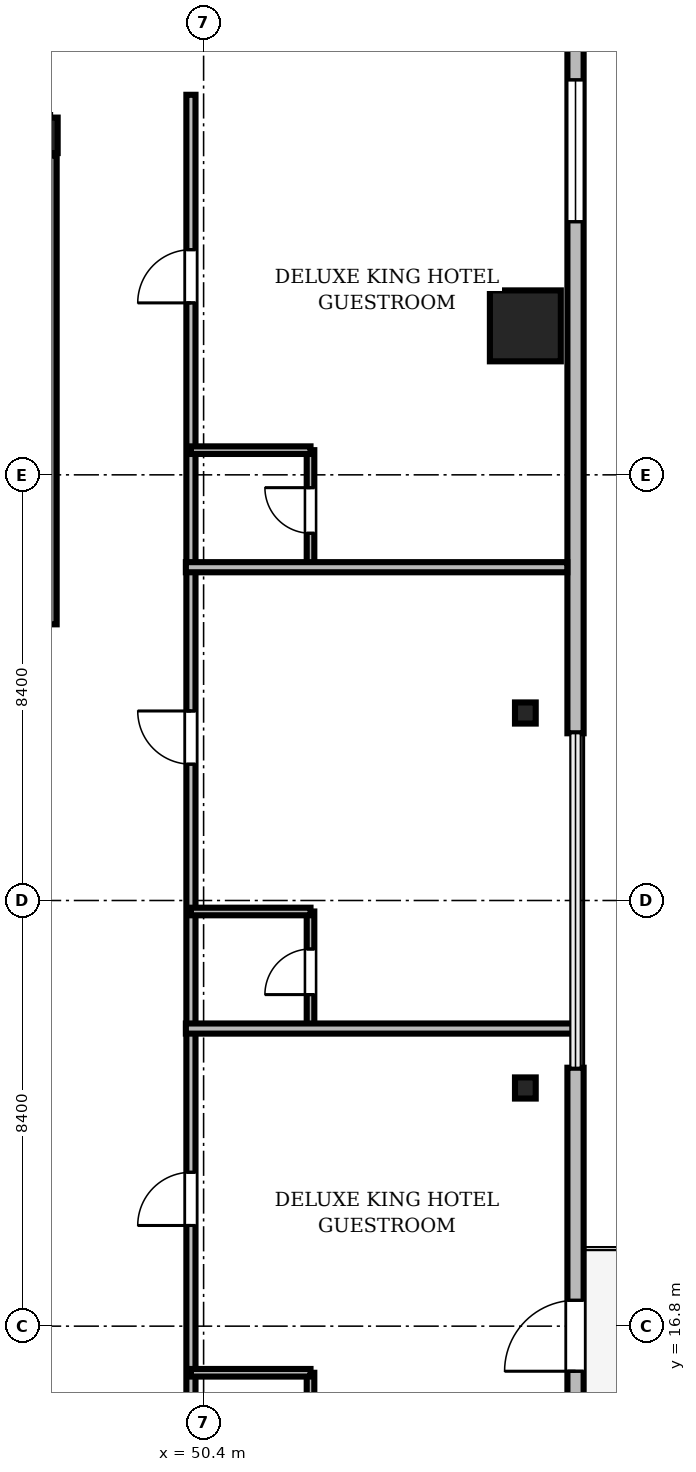
"""IFC4 building model, lengths in metres.
Left out: names, types, materials, properties, quantities, classifications, styles, units other than length and angle.
Written with IfcOpenShell. Run it as: python <this file> out.ifc"""

import sys

from ifc_helpers import new_model, si_unit, direction, frame, frame_2d, origin, origin_2d, place, context, subcontext, project, spatial, rectangle, i_section, extrude, source, transform, mapped, element, fill, save


model = new_model("IFC4")
c1 = context("Model", 3, precision=1e-05, world=origin(), true_north=direction((0.0, 1.0)))
c2 = subcontext(c1, "Body", "Model", "MODEL_VIEW")
j1 = project(units=[si_unit("LENGTHUNIT", "METRE"), si_unit("PLANEANGLEUNIT", "RADIAN")], contexts=[c1])
p1 = place(None, origin())
s1 = spatial("IfcSite", under=j1, at=p1, CompositionType="ELEMENT")
p2 = place(p1, origin())
s2 = spatial("IfcBuilding", under=s1, at=p2, CompositionType="ELEMENT")
p3 = place(p2, frame((0.0, 0.0, 218.55)))
s3 = spatial("IfcBuildingStorey", under=s2, at=p3, CompositionType="ELEMENT", Elevation=218.55)
m1 = source(origin(), c2, "Body", "SweptSolid", [
    extrude(i_section(OverallWidth=0.3, OverallDepth=0.7, WebThickness=0.017, FlangeThickness=0.032, FilletRadius=0.027, at=origin_2d()), origin(), (0.0, 0.0, 1.0), 3.53),
])
p4 = place(p3, frame((47.37, 40.3, 0.0), z_axis=(0.0, 0.0, 1.0), x_axis=(1.0, 0.0, 0.0)))
e1 = element("IfcColumn", 1, at=p4, inside=s3, PredefinedType="COLUMN", context=c2, shape_type="MappedRepresentation", body=[
    mapped(m1, transform((0.0, 0.0, 0.0), scale=1.0)),
])
m2 = source(origin(), c2, "Body", "SweptSolid", [
    extrude(rectangle(XDim=1.4, YDim=1.4, at=origin_2d()), origin(), (0.0, 0.0, 1.0), 3.53),
])
p5 = place(p3, frame((56.75, 36.54, 0.0), z_axis=(0.0, 0.0, 1.0), x_axis=(1.0, 0.0, 0.0)))
e2 = element("IfcColumn", 2, at=p5, inside=s3, PredefinedType="COLUMN", context=c2, shape_type="MappedRepresentation", body=[
    mapped(m2, transform((0.0, 0.0, 0.0), scale=1.0)),
])
m3 = source(origin(), c2, "Body", "SweptSolid", [
    extrude(i_section(OverallWidth=0.409, OverallDepth=0.417, WebThickness=0.021, FlangeThickness=0.033, FilletRadius=0.015, at=origin_2d()), origin(), (0.0, 0.0, 1.0), 3.53),
])
for number, where, z_axis, x_axis in (
    (3, (56.75, 21.5, 0.0), (0.0, 0.0, 1.0), (1.0, 0.0, 0.0)),
    (4, (56.75, 28.9, 0.0), (0.0, 0.0, 1.0), (1.0, 0.0, 0.0)),
):
    element("IfcColumn", number, at=place(p3, frame(where, z_axis=z_axis, x_axis=x_axis)), inside=s3, PredefinedType="COLUMN", context=c2, shape_type="MappedRepresentation", body=[
        mapped(m3, transform((0.0, 0.0, 0.0), scale=1.0)),
    ])
m4 = source(origin(), c2, "Body", "SweptSolid", [
    extrude(rectangle(XDim=15.6, YDim=0.32, at=frame_2d((7.8, 0.0))), origin(), (0.0, 0.0, 1.0), 3.53),
])
p6 = place(p3, frame((57.74, 6.3, 0.0), z_axis=(0.0, 0.0, 1.0), x_axis=(0.0, 1.0, 0.0)))
e5 = element("IfcWall", 5, at=p6, inside=s3, PredefinedType="SOLIDWALL", context=c2, shape_type="MappedRepresentation", body=[
    mapped(m4, transform((0.0, 0.0, 0.0), scale=1.0)),
])
m5 = source(origin(), c2, "Body", "SweptSolid", [
    extrude(rectangle(XDim=1.4, YDim=2.3, at=frame_2d((0.7, 1.15))), frame((0.0, 0.17, 0.0), z_axis=(0.0, -1.0, 0.0), x_axis=(1.0, 0.0, 0.0)), (0.0, 0.0, 1.0), 0.34),
])
p7 = place(p6, frame((9.61, 0.0, 0.0)))
e6 = element("IfcOpeningElement", 6, at=p7, cuts=e5, PredefinedType="OPENING", context=c2, shape_type="MappedRepresentation", body=[
    mapped(m5, transform((0.0, 0.0, 0.0), scale=1.0)),
])
m6 = source(origin(), c2, "Body", "SweptSolid", [
    extrude(rectangle(XDim=2.8, YDim=2.4, at=frame_2d((1.4, 1.2))), frame((0.0, 0.17, 0.0), z_axis=(0.0, -1.0, 0.0), x_axis=(1.0, 0.0, 0.0)), (0.0, 0.0, 1.0), 0.34),
])
p8 = place(p6, frame((2.705, 0.0, 0.72)))
e7 = element("IfcOpeningElement", 7, at=p8, cuts=e5, PredefinedType="OPENING", context=c2, shape_type="MappedRepresentation", body=[
    mapped(m6, transform((0.0, 0.0, 0.0), scale=1.0)),
])
m7 = source(origin(), c2, "Body", "SweptSolid", [
    extrude(rectangle(XDim=15.6, YDim=0.32, at=frame_2d((7.8, 0.0))), origin(), (0.0, 0.0, 1.0), 3.53),
])
p9 = place(p3, frame((57.74, 28.5, 0.0), z_axis=(0.0, 0.0, 1.0), x_axis=(0.0, 1.0, 0.0)))
e8 = element("IfcWall", 8, at=p9, inside=s3, PredefinedType="SOLIDWALL", context=c2, shape_type="MappedRepresentation", body=[
    mapped(m7, transform((0.0, 0.0, 0.0), scale=1.0)),
])
p10 = place(p9, frame((10.095, 0.0, 0.72)))
e9 = element("IfcOpeningElement", 9, at=p10, cuts=e8, PredefinedType="OPENING", context=c2, shape_type="MappedRepresentation", body=[
    mapped(m6, transform((0.0, 0.0, 0.0), scale=1.0)),
])
m8 = source(origin(), c2, "Body", "SweptSolid", [
    extrude(rectangle(XDim=9.25, YDim=0.25, at=frame_2d((4.625, 0.0))), origin(), (0.0, 0.0, 1.0), 3.55),
])
p11 = place(p3, frame((47.375, 30.65, 0.0), z_axis=(0.0, 0.0, 1.0), x_axis=(0.0, 1.0, 0.0)))
e10 = element("IfcWall", 10, at=p11, inside=s3, PredefinedType="SOLIDWALL", context=c2, shape_type="MappedRepresentation", body=[
    mapped(m8, transform((0.0, 0.0, 0.0), scale=1.0)),
])
m9 = source(origin(), c2, "Body", "SweptSolid", [
    extrude(rectangle(XDim=27.53, YDim=0.18, at=frame_2d((13.765, 0.0))), origin(), (0.0, 0.0, 1.0), 2.972),
])
p12 = place(p3, frame((50.15, 13.57, 0.0), z_axis=(0.0, 0.0, 1.0), x_axis=(0.0, 1.0, 0.0)))
e11 = element("IfcWall", 11, at=p12, inside=s3, PredefinedType="PARTITIONING", context=c2, shape_type="MappedRepresentation", body=[
    mapped(m9, transform((0.0, 0.0, 0.0), scale=1.0)),
])
m10 = source(origin(), c2, "Body", "SweptSolid", [
    extrude(rectangle(XDim=1.05, YDim=2.2, at=frame_2d((0.525, 1.1))), frame((0.0, 0.1, 0.0), z_axis=(0.0, -1.0, 0.0), x_axis=(1.0, 0.0, 0.0)), (0.0, 0.0, 1.0), 0.2),
])
p13 = place(p12, frame((5.217, 0.0, 0.0)))
e12 = element("IfcOpeningElement", 12, at=p13, cuts=e11, PredefinedType="OPENING", context=c2, shape_type="MappedRepresentation", body=[
    mapped(m10, transform((0.0, 0.0, 0.0), scale=1.0)),
])
p14 = place(p12, frame((14.32, 0.0, 0.0)))
e13 = element("IfcOpeningElement", 13, at=p14, cuts=e11, PredefinedType="OPENING", context=c2, shape_type="MappedRepresentation", body=[
    mapped(m10, transform((0.0, 0.0, 0.0), scale=1.0)),
])
p15 = place(p12, frame((23.423, 0.0, 0.0)))
e14 = element("IfcOpeningElement", 14, at=p15, cuts=e11, PredefinedType="OPENING", context=c2, shape_type="MappedRepresentation", body=[
    mapped(m10, transform((0.0, 0.0, 0.0), scale=1.0)),
])
m11 = source(origin(), c2, "Body", "SweptSolid", [
    extrude(rectangle(XDim=2.29, YDim=0.15, at=frame_2d((1.145, 0.0))), origin(), (0.0, 0.0, 1.0), 2.972),
])
p16 = place(p3, frame((52.51, 13.59, 0.0), z_axis=(0.0, 0.0, 1.0), x_axis=(0.0, 1.0, 0.0)))
e15 = element("IfcWall", 15, at=p16, inside=s3, PredefinedType="PARTITIONING", context=c2, shape_type="MappedRepresentation", body=[
    mapped(m11, transform((0.0, 0.0, 0.0), scale=1.0)),
])
m12 = source(origin(), c2, "Body", "SweptSolid", [
    extrude(rectangle(XDim=0.9, YDim=2.1, at=frame_2d((0.45, 1.05))), frame((0.0, 0.085, 0.0), z_axis=(0.0, -1.0, 0.0), x_axis=(1.0, 0.0, 0.0)), (0.0, 0.0, 1.0), 0.17),
])
p17 = place(p16, frame((0.65, 0.0, 0.0)))
e16 = element("IfcOpeningElement", 16, at=p17, cuts=e15, PredefinedType="OPENING", context=c2, shape_type="MappedRepresentation", body=[
    mapped(m12, transform((0.0, 0.0, 0.0), scale=1.0)),
])
m13 = source(origin(), c2, "Body", "SweptSolid", [
    extrude(rectangle(XDim=2.29, YDim=0.15, at=frame_2d((1.145, 0.0))), origin(), (0.0, 0.0, 1.0), 3.222),
])
p18 = place(p3, frame((52.51, 22.693, 0.0), z_axis=(0.0, 0.0, 1.0), x_axis=(0.0, 1.0, 0.0)))
e17 = element("IfcWall", 17, at=p18, inside=s3, PredefinedType="PARTITIONING", context=c2, shape_type="MappedRepresentation", body=[
    mapped(m13, transform((0.0, 0.0, 0.0), scale=1.0)),
])
p19 = place(p18, frame((0.65, 0.0, 0.0)))
e18 = element("IfcOpeningElement", 18, at=p19, cuts=e17, PredefinedType="OPENING", context=c2, shape_type="MappedRepresentation", body=[
    mapped(m12, transform((0.0, 0.0, 0.0), scale=1.0)),
])
m14 = source(origin(), c2, "Body", "SweptSolid", [
    extrude(rectangle(XDim=2.29, YDim=0.15, at=frame_2d((1.145, 0.0))), origin(), (0.0, 0.0, 1.0), 3.53),
])
p20 = place(p3, frame((52.51, 31.797, 0.0), z_axis=(0.0, 0.0, 1.0), x_axis=(0.0, 1.0, 0.0)))
e19 = element("IfcWall", 19, at=p20, inside=s3, PredefinedType="PARTITIONING", context=c2, shape_type="MappedRepresentation", body=[
    mapped(m14, transform((0.0, 0.0, 0.0), scale=1.0)),
])
p21 = place(p20, frame((0.65, 0.0, 0.0)))
e20 = element("IfcOpeningElement", 20, at=p21, cuts=e19, PredefinedType="OPENING", context=c2, shape_type="MappedRepresentation", body=[
    mapped(m12, transform((0.0, 0.0, 0.0), scale=1.0)),
])
m15 = source(origin(), c2, "Body", "SweptSolid", [
    extrude(rectangle(XDim=7.72, YDim=0.2, at=frame_2d((3.86, 0.0))), origin(), (0.0, 0.0, 1.0), 2.772),
])
p22 = place(p3, frame((50.05, 22.673, 0.0), z_axis=(0.0, 0.0, 1.0), x_axis=(1.0, 0.0, 0.0)))
e21 = element("IfcWall", 21, at=p22, inside=s3, PredefinedType="PARTITIONING", context=c2, shape_type="MappedRepresentation", body=[
    mapped(m15, transform((0.0, 0.0, 0.0), scale=1.0)),
])
m16 = source(origin(), c2, "Body", "SweptSolid", [
    extrude(rectangle(XDim=7.528, YDim=0.2, at=frame_2d((3.764, 0.0))), origin(), (0.0, 0.0, 1.0), 2.772),
])
p23 = place(p3, frame((50.05, 31.777, 0.0), z_axis=(0.0, 0.0, 1.0), x_axis=(1.0, 0.0, 0.0)))
e22 = element("IfcWall", 22, at=p23, inside=s3, PredefinedType="PARTITIONING", context=c2, shape_type="MappedRepresentation", body=[
    mapped(m16, transform((0.0, 0.0, 0.0), scale=1.0)),
])
m17 = source(origin(), c2, "Body", "SweptSolid", [
    extrude(rectangle(XDim=2.36, YDim=0.15, at=frame_2d((1.18, 0.0))), origin(), (0.0, 0.0, 1.0), 3.53),
])
for number, where, z_axis, x_axis in (
    (23, (50.15, 15.88, 0.0), (0.0, 0.0, 1.0), (1.0, 0.0, 0.0)),
    (24, (50.15, 24.983, 0.0), (0.0, 0.0, 1.0), (1.0, 0.0, 0.0)),
    (25, (50.15, 34.087, 0.0), (0.0, 0.0, 1.0), (1.0, 0.0, 0.0)),
):
    element("IfcWall", number, at=place(p3, frame(where, z_axis=z_axis, x_axis=x_axis)), inside=s3, PredefinedType="PARTITIONING", context=c2, shape_type="MappedRepresentation", body=[
        mapped(m17, transform((0.0, 0.0, 0.0), scale=1.0)),
    ])
m18 = source(origin(), c2, "Body", "SweptSolid", [
    extrude(rectangle(XDim=1.4, YDim=2.3, at=frame_2d((0.7, 1.15))), frame((0.0, 0.025, 0.0), z_axis=(0.0, -1.0, 0.0), x_axis=(1.0, 0.0, 0.0)), (0.0, 0.0, 1.0), 0.05),
])
p24 = place(p7, frame((1.4, 0.0, 0.0), z_axis=(0.0, 0.0, 1.0), x_axis=(-1.0, 0.0, 0.0)))
e26 = element("IfcDoor", 26, at=p24, inside=s3, OperationType="DOUBLE_DOOR_SLIDING", PredefinedType="DOOR", context=c2, shape_type="MappedRepresentation", body=[
    mapped(m18, transform((0.0, 0.0, 0.0), scale=1.0)),
])
fill(e6, e26)
m19 = source(origin(), c2, "Body", "SweptSolid", [
    extrude(rectangle(XDim=2.8, YDim=2.4, at=frame_2d((1.4, 1.2))), frame((0.0, 0.03, 0.0), z_axis=(0.0, -1.0, 0.0), x_axis=(1.0, 0.0, 0.0)), (0.0, 0.0, 1.0), 0.06),
])
p25 = place(p10, origin())
e27 = element("IfcWindow", 27, at=p25, inside=s3, PartitioningType="SINGLE_PANEL", PredefinedType="WINDOW", context=c2, shape_type="MappedRepresentation", body=[
    mapped(m19, transform((0.0, 0.0, 0.0), scale=1.0)),
])
fill(e9, e27)
m20 = source(origin(), c2, "Body", "SweptSolid", [
    extrude(rectangle(XDim=1.05, YDim=2.2, at=frame_2d((0.525, 1.1))), frame((0.0, 0.025, 0.0), z_axis=(0.0, -1.0, 0.0), x_axis=(1.0, 0.0, 0.0)), (0.0, 0.0, 1.0), 0.05),
])
p26 = place(p13, origin())
e28 = element("IfcDoor", 28, at=p26, inside=s3, OperationType="SINGLE_SWING_LEFT", PredefinedType="DOOR", context=c2, shape_type="MappedRepresentation", body=[
    mapped(m20, transform((0.0, 0.0, 0.0), scale=1.0)),
])
fill(e12, e28)
p27 = place(p14, origin())
e29 = element("IfcDoor", 29, at=p27, inside=s3, OperationType="SINGLE_SWING_RIGHT", PredefinedType="DOOR", context=c2, shape_type="MappedRepresentation", body=[
    mapped(m20, transform((0.0, 0.0, 0.0), scale=1.0)),
])
fill(e13, e29)
p28 = place(p15, origin())
e30 = element("IfcDoor", 30, at=p28, inside=s3, OperationType="SINGLE_SWING_LEFT", PredefinedType="DOOR", context=c2, shape_type="MappedRepresentation", body=[
    mapped(m20, transform((0.0, 0.0, 0.0), scale=1.0)),
])
fill(e14, e30)
m21 = source(origin(), c2, "Body", "SweptSolid", [
    extrude(rectangle(XDim=0.9, YDim=2.1, at=frame_2d((0.45, 1.05))), frame((0.0, 0.025, 0.0), z_axis=(0.0, -1.0, 0.0), x_axis=(1.0, 0.0, 0.0)), (0.0, 0.0, 1.0), 0.05),
])
p29 = place(p19, origin())
e31 = element("IfcDoor", 31, at=p29, inside=s3, OperationType="SINGLE_SWING_LEFT", PredefinedType="DOOR", context=c2, shape_type="MappedRepresentation", body=[
    mapped(m21, transform((0.0, 0.0, 0.0), scale=1.0)),
])
fill(e18, e31)
p30 = place(p21, origin())
e32 = element("IfcDoor", 32, at=p30, inside=s3, OperationType="SINGLE_SWING_RIGHT", PredefinedType="DOOR", context=c2, shape_type="MappedRepresentation", body=[
    mapped(m21, transform((0.0, 0.0, 0.0), scale=1.0)),
])
fill(e20, e32)
save(model, sys.argv[1])
